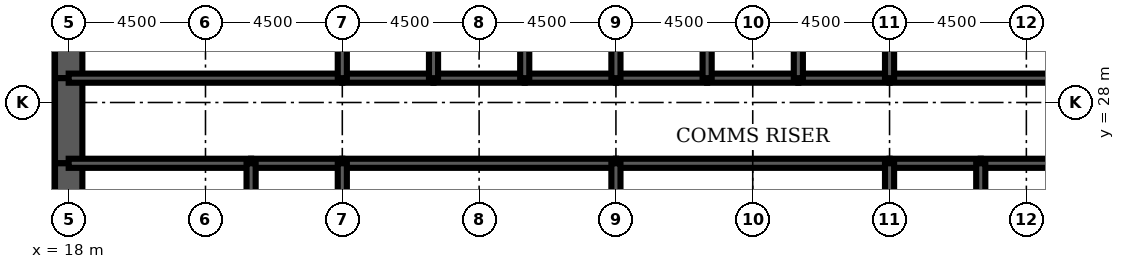
"""IFC4 building model, lengths in metres.
Left out: names, types, materials, properties, quantities, classifications, styles, units other than length and angle.
Written with IfcOpenShell. Run it as: python <this file> out.ifc"""

import sys

from ifc_helpers import new_model, si_unit, direction, frame, frame_2d, origin, place, context, subcontext, project, spatial, rectangle, extrude, element, fill, save


model = new_model("IFC4")
c1 = context("Model", 3, precision=1e-05, world=origin(), true_north=direction((0.0, 1.0)))
c2 = subcontext(c1, "Body", "Model", "MODEL_VIEW")
j1 = project(units=[si_unit("LENGTHUNIT", "METRE"), si_unit("PLANEANGLEUNIT", "RADIAN")], contexts=[c1])
p1 = place(None, origin())
s1 = spatial("IfcSite", under=j1, at=p1, CompositionType="ELEMENT")
p2 = place(p1, origin())
s2 = spatial("IfcBuilding", under=s1, at=p2, CompositionType="ELEMENT")
p3 = place(p2, frame((0.0, 0.0, 134.1)))
s3 = spatial("IfcBuildingStorey", under=s2, at=p3, CompositionType="ELEMENT", Elevation=134.1)
p4 = place(p3, frame((18.0, 32.0, 0.0), z_axis=(0.0, 0.0, 1.0), x_axis=(0.0, -1.0, 0.0)))
e1 = element("IfcWall", 1, at=p4, inside=s3, PredefinedType="SHEAR", context=c2, shape_type="SweptSolid", body=[
    extrude(rectangle(XDim=3.2, YDim=0.9, at=frame_2d((1.6, 0.0))), origin(), (0.0, 0.0, 1.0), 4.2),
])
p5 = place(p3, frame((18.0, 28.8, 0.0), z_axis=(0.0, 0.0, 1.0), x_axis=(0.0, -1.0, 0.0)))
e2 = element("IfcWall", 2, at=p5, inside=s3, PredefinedType="SHEAR", context=c2, shape_type="SweptSolid", body=[
    extrude(rectangle(XDim=2.8, YDim=0.9, at=frame_2d((1.4, 0.0))), origin(), (0.0, 0.0, 1.0), 4.2),
])
p6 = place(p5, frame((0.4, 0.0, 0.0)))
e3 = element("IfcOpeningElement", 3, at=p6, cuts=e2, PredefinedType="OPENING", context=c2, shape_type="SweptSolid", body=[
    extrude(rectangle(XDim=1.8, YDim=2.1, at=frame_2d((0.9, 1.05))), frame((0.0, 0.46, 0.0), z_axis=(0.0, -1.0, 0.0), x_axis=(1.0, 0.0, 0.0)), (0.0, 0.0, 1.0), 0.92),
])
p7 = place(p3, frame((18.0, 26.0, 0.0), z_axis=(0.0, 0.0, 1.0), x_axis=(0.0, -1.0, 0.0)))
e4 = element("IfcWall", 4, at=p7, inside=s3, PredefinedType="SHEAR", context=c2, shape_type="SweptSolid", body=[
    extrude(rectangle(XDim=4.0, YDim=0.9, at=frame_2d((2.0, 0.0))), origin(), (0.0, 0.0, 1.0), 4.2),
])
p8 = place(p3, frame((18.0, 28.8, 0.0), z_axis=(0.0, 0.0, 1.0), x_axis=(1.0, 0.0, 0.0)))
e5 = element("IfcWall", 5, at=p8, inside=s3, PredefinedType="SOLIDWALL", context=c2, shape_type="SweptSolid", body=[
    extrude(rectangle(XDim=9.0, YDim=0.3, at=frame_2d((4.5, 0.0))), origin(), (0.0, 0.0, 1.0), 4.2),
])
p9 = place(p8, frame((0.65, 0.0, 0.0)))
e6 = element("IfcOpeningElement", 6, at=p9, cuts=e5, PredefinedType="OPENING", context=c2, shape_type="SweptSolid", body=[
    extrude(rectangle(XDim=1.0, YDim=2.1, at=frame_2d((0.5, 1.05))), frame((0.0, 0.16, 0.0), z_axis=(0.0, -1.0, 0.0), x_axis=(1.0, 0.0, 0.0)), (0.0, 0.0, 1.0), 0.32),
])
p10 = place(p3, frame((27.0, 28.8, 0.0), z_axis=(0.0, 0.0, 1.0), x_axis=(1.0, 0.0, 0.0)))
e7 = element("IfcWall", 7, at=p10, inside=s3, PredefinedType="SOLIDWALL", context=c2, shape_type="SweptSolid", body=[
    extrude(rectangle(XDim=3.0, YDim=0.3, at=frame_2d((1.5, 0.0))), origin(), (0.0, 0.0, 1.0), 4.2),
])
p11 = place(p10, frame((0.95, 0.0, 0.0)))
e8 = element("IfcOpeningElement", 8, at=p11, cuts=e7, PredefinedType="OPENING", context=c2, shape_type="SweptSolid", body=[
    extrude(rectangle(XDim=1.1, YDim=2.2, at=frame_2d((0.55, 1.1))), frame((0.0, 0.16, 0.0), z_axis=(0.0, -1.0, 0.0), x_axis=(1.0, 0.0, 0.0)), (0.0, 0.0, 1.0), 0.32),
])
p12 = place(p3, frame((30.0, 28.8, 0.0), z_axis=(0.0, 0.0, 1.0), x_axis=(1.0, 0.0, 0.0)))
e9 = element("IfcWall", 9, at=p12, inside=s3, PredefinedType="SOLIDWALL", context=c2, shape_type="SweptSolid", body=[
    extrude(rectangle(XDim=3.0, YDim=0.3, at=frame_2d((1.5, 0.0))), origin(), (0.0, 0.0, 1.0), 4.2),
])
p13 = place(p12, frame((0.95, 0.0, 0.0)))
e10 = element("IfcOpeningElement", 10, at=p13, cuts=e9, PredefinedType="OPENING", context=c2, shape_type="SweptSolid", body=[
    extrude(rectangle(XDim=1.1, YDim=2.2, at=frame_2d((0.55, 1.1))), frame((0.0, 0.16, 0.0), z_axis=(0.0, -1.0, 0.0), x_axis=(1.0, 0.0, 0.0)), (0.0, 0.0, 1.0), 0.32),
])
p14 = place(p3, frame((33.0, 28.8, 0.0), z_axis=(0.0, 0.0, 1.0), x_axis=(1.0, 0.0, 0.0)))
e11 = element("IfcWall", 11, at=p14, inside=s3, PredefinedType="SOLIDWALL", context=c2, shape_type="SweptSolid", body=[
    extrude(rectangle(XDim=3.0, YDim=0.3, at=frame_2d((1.5, 0.0))), origin(), (0.0, 0.0, 1.0), 4.2),
])
p15 = place(p14, frame((0.95, 0.0, 0.0)))
e12 = element("IfcOpeningElement", 12, at=p15, cuts=e11, PredefinedType="OPENING", context=c2, shape_type="SweptSolid", body=[
    extrude(rectangle(XDim=1.1, YDim=2.2, at=frame_2d((0.55, 1.1))), frame((0.0, 0.16, 0.0), z_axis=(0.0, -1.0, 0.0), x_axis=(1.0, 0.0, 0.0)), (0.0, 0.0, 1.0), 0.32),
])
for number, where, z_axis, x_axis in (
    (13, (36.0, 28.8, 0.0), (0.0, 0.0, 1.0), (1.0, 0.0, 0.0)),
    (14, (39.0, 28.8, 0.0), (0.0, 0.0, 1.0), (1.0, 0.0, 0.0)),
):
    element("IfcWall", number, at=place(p3, frame(where, z_axis=z_axis, x_axis=x_axis)), inside=s3, PredefinedType="SOLIDWALL", context=c2, shape_type="SweptSolid", body=[
        extrude(rectangle(XDim=3.0, YDim=0.3, at=frame_2d((1.5, 0.0))), origin(), (0.0, 0.0, 1.0), 4.2),
    ])
p16 = place(p3, frame((42.0, 28.8, 0.0), z_axis=(0.0, 0.0, 1.0), x_axis=(1.0, 0.0, 0.0)))
e15 = element("IfcWall", 15, at=p16, inside=s3, PredefinedType="SOLIDWALL", context=c2, shape_type="SweptSolid", body=[
    extrude(rectangle(XDim=3.0, YDim=0.3, at=frame_2d((1.5, 0.0))), origin(), (0.0, 0.0, 1.0), 4.2),
])
p17 = place(p16, frame((0.95, 0.0, 0.0)))
e16 = element("IfcOpeningElement", 16, at=p17, cuts=e15, PredefinedType="OPENING", context=c2, shape_type="SweptSolid", body=[
    extrude(rectangle(XDim=1.1, YDim=2.2, at=frame_2d((0.55, 1.1))), frame((0.0, 0.16, 0.0), z_axis=(0.0, -1.0, 0.0), x_axis=(1.0, 0.0, 0.0)), (0.0, 0.0, 1.0), 0.32),
])
p18 = place(p3, frame((45.0, 28.8, 0.0), z_axis=(0.0, 0.0, 1.0), x_axis=(1.0, 0.0, 0.0)))
e17 = element("IfcWall", 17, at=p18, inside=s3, PredefinedType="SOLIDWALL", context=c2, shape_type="SweptSolid", body=[
    extrude(rectangle(XDim=9.0, YDim=0.3, at=frame_2d((4.5, 0.0))), origin(), (0.0, 0.0, 1.0), 4.2),
])
p19 = place(p18, frame((7.35, 0.0, 0.0)))
e18 = element("IfcOpeningElement", 18, at=p19, cuts=e17, PredefinedType="OPENING", context=c2, shape_type="SweptSolid", body=[
    extrude(rectangle(XDim=1.0, YDim=2.1, at=frame_2d((0.5, 1.05))), frame((0.0, 0.16, 0.0), z_axis=(0.0, -1.0, 0.0), x_axis=(1.0, 0.0, 0.0)), (0.0, 0.0, 1.0), 0.32),
])
p20 = place(p3, frame((18.0, 26.0, 0.0), z_axis=(0.0, 0.0, 1.0), x_axis=(1.0, 0.0, 0.0)))
e19 = element("IfcWall", 19, at=p20, inside=s3, PredefinedType="SOLIDWALL", context=c2, shape_type="SweptSolid", body=[
    extrude(rectangle(XDim=6.0, YDim=0.3, at=frame_2d((3.0, 0.0))), origin(), (0.0, 0.0, 1.0), 4.2),
])
p21 = place(p3, frame((24.0, 26.0, 0.0), z_axis=(0.0, 0.0, 1.0), x_axis=(1.0, 0.0, 0.0)))
e20 = element("IfcWall", 20, at=p21, inside=s3, PredefinedType="SOLIDWALL", context=c2, shape_type="SweptSolid", body=[
    extrude(rectangle(XDim=3.0, YDim=0.3, at=frame_2d((1.5, 0.0))), origin(), (0.0, 0.0, 1.0), 4.2),
])
for number, where, z_axis, x_axis in (
    (21, (27.0, 26.0, 0.0), (0.0, 0.0, 1.0), (1.0, 0.0, 0.0)),
    (22, (36.0, 26.0, 0.0), (0.0, 0.0, 1.0), (1.0, 0.0, 0.0)),
):
    element("IfcWall", number, at=place(p3, frame(where, z_axis=z_axis, x_axis=x_axis)), inside=s3, PredefinedType="SOLIDWALL", context=c2, shape_type="SweptSolid", body=[
        extrude(rectangle(XDim=9.0, YDim=0.3, at=frame_2d((4.5, 0.0))), origin(), (0.0, 0.0, 1.0), 4.2),
    ])
p22 = place(p3, frame((45.0, 26.0, 0.0), z_axis=(0.0, 0.0, 1.0), x_axis=(1.0, 0.0, 0.0)))
e23 = element("IfcWall", 23, at=p22, inside=s3, PredefinedType="SOLIDWALL", context=c2, shape_type="SweptSolid", body=[
    extrude(rectangle(XDim=3.0, YDim=0.3, at=frame_2d((1.5, 0.0))), origin(), (0.0, 0.0, 1.0), 4.2),
])
p23 = place(p3, frame((48.0, 26.0, 0.0), z_axis=(0.0, 0.0, 1.0), x_axis=(1.0, 0.0, 0.0)))
e24 = element("IfcWall", 24, at=p23, inside=s3, PredefinedType="SOLIDWALL", context=c2, shape_type="SweptSolid", body=[
    extrude(rectangle(XDim=6.0, YDim=0.3, at=frame_2d((3.0, 0.0))), origin(), (0.0, 0.0, 1.0), 4.2),
])
for number, where, z_axis, x_axis in (
    (25, (27.0, 28.8, 0.0), (0.0, 0.0, 1.0), (0.0, 1.0, 0.0)),
    (26, (30.0, 28.8, 0.0), (0.0, 0.0, 1.0), (0.0, 1.0, 0.0)),
    (27, (33.0, 28.8, 0.0), (0.0, 0.0, 1.0), (0.0, 1.0, 0.0)),
    (28, (36.0, 28.8, 0.0), (0.0, 0.0, 1.0), (0.0, 1.0, 0.0)),
    (29, (39.0, 28.8, 0.0), (0.0, 0.0, 1.0), (0.0, 1.0, 0.0)),
    (30, (42.0, 28.8, 0.0), (0.0, 0.0, 1.0), (0.0, 1.0, 0.0)),
    (31, (45.0, 28.8, 0.0), (0.0, 0.0, 1.0), (0.0, 1.0, 0.0)),
):
    element("IfcWall", number, at=place(p3, frame(where, z_axis=z_axis, x_axis=x_axis)), inside=s3, PredefinedType="SOLIDWALL", context=c2, shape_type="SweptSolid", body=[
        extrude(rectangle(XDim=3.2, YDim=0.3, at=frame_2d((1.6, 0.0))), origin(), (0.0, 0.0, 1.0), 4.2),
    ])
for number, where, z_axis, x_axis in (
    (32, (24.0, 22.0, 0.0), (0.0, 0.0, 1.0), (0.0, 1.0, 0.0)),
    (33, (27.0, 22.0, 0.0), (0.0, 0.0, 1.0), (0.0, 1.0, 0.0)),
    (34, (36.0, 22.0, 0.0), (0.0, 0.0, 1.0), (0.0, 1.0, 0.0)),
    (35, (45.0, 22.0, 0.0), (0.0, 0.0, 1.0), (0.0, 1.0, 0.0)),
    (36, (48.0, 22.0, 0.0), (0.0, 0.0, 1.0), (0.0, 1.0, 0.0)),
):
    element("IfcWall", number, at=place(p3, frame(where, z_axis=z_axis, x_axis=x_axis)), inside=s3, PredefinedType="SOLIDWALL", context=c2, shape_type="SweptSolid", body=[
        extrude(rectangle(XDim=4.0, YDim=0.3, at=frame_2d((2.0, 0.0))), origin(), (0.0, 0.0, 1.0), 4.2),
    ])
p24 = place(p3, frame((20.025, 22.15, 0.0), z_axis=(0.0, 0.0, 1.0), x_axis=(0.0, 1.0, 0.0)))
e37 = element("IfcWall", 37, at=p24, inside=s3, PredefinedType="PARTITIONING", context=c2, shape_type="SweptSolid", body=[
    extrude(rectangle(XDim=3.7, YDim=0.15, at=frame_2d((1.85, 0.0))), origin(), (0.0, 0.0, 1.0), 3.0),
])
p25 = place(p3, frame((49.2, 26.15, 0.0), z_axis=(0.0, 0.0, 1.0), x_axis=(0.0, 1.0, 0.0)))
e38 = element("IfcWall", 38, at=p25, inside=s3, PredefinedType="PARTITIONING", context=c2, shape_type="SweptSolid", body=[
    extrude(rectangle(XDim=2.5, YDim=0.15, at=frame_2d((1.25, 0.0))), origin(), (0.0, 0.0, 1.0), 3.0),
])
p26 = place(p25, frame((1.15, 0.0, 0.0)))
e39 = element("IfcOpeningElement", 39, at=p26, cuts=e38, PredefinedType="OPENING", context=c2, shape_type="SweptSolid", body=[
    extrude(rectangle(XDim=1.0, YDim=2.1, at=frame_2d((0.5, 1.05))), frame((0.0, 0.085, 0.0), z_axis=(0.0, -1.0, 0.0), x_axis=(1.0, 0.0, 0.0)), (0.0, 0.0, 1.0), 0.17),
])
p27 = place(p26, origin())
e40 = element("IfcDoor", 40, at=p27, inside=s3, OperationType="SINGLE_SWING_RIGHT", PredefinedType="DOOR", context=c2, shape_type="SweptSolid", body=[
    extrude(rectangle(XDim=1.0, YDim=2.1, at=frame_2d((0.5, 1.05))), frame((0.0, 0.025, 0.0), z_axis=(0.0, -1.0, 0.0), x_axis=(1.0, 0.0, 0.0)), (0.0, 0.0, 1.0), 0.05),
])
fill(e39, e40)
p28 = place(p17, origin())
e41 = element("IfcDoor", 41, at=p28, inside=s3, OperationType="DOUBLE_DOOR_SLIDING", PredefinedType="USERDEFINED", context=c2, shape_type="SweptSolid", body=[
    extrude(rectangle(XDim=1.1, YDim=2.2, at=frame_2d((0.55, 1.1))), frame((0.0, 0.025, 0.0), z_axis=(0.0, -1.0, 0.0), x_axis=(1.0, 0.0, 0.0)), (0.0, 0.0, 1.0), 0.05),
])
fill(e16, e41)
p29 = place(p11, origin())
e42 = element("IfcDoor", 42, at=p29, inside=s3, OperationType="DOUBLE_DOOR_SLIDING", PredefinedType="USERDEFINED", context=c2, shape_type="SweptSolid", body=[
    extrude(rectangle(XDim=1.1, YDim=2.2, at=frame_2d((0.55, 1.1))), frame((0.0, 0.025, 0.0), z_axis=(0.0, -1.0, 0.0), x_axis=(1.0, 0.0, 0.0)), (0.0, 0.0, 1.0), 0.05),
])
fill(e8, e42)
p30 = place(p13, origin())
e43 = element("IfcDoor", 43, at=p30, inside=s3, OperationType="DOUBLE_DOOR_SLIDING", PredefinedType="USERDEFINED", context=c2, shape_type="SweptSolid", body=[
    extrude(rectangle(XDim=1.1, YDim=2.2, at=frame_2d((0.55, 1.1))), frame((0.0, 0.025, 0.0), z_axis=(0.0, -1.0, 0.0), x_axis=(1.0, 0.0, 0.0)), (0.0, 0.0, 1.0), 0.05),
])
fill(e10, e43)
p31 = place(p15, origin())
e44 = element("IfcDoor", 44, at=p31, inside=s3, OperationType="DOUBLE_DOOR_SLIDING", PredefinedType="USERDEFINED", context=c2, shape_type="SweptSolid", body=[
    extrude(rectangle(XDim=1.1, YDim=2.2, at=frame_2d((0.55, 1.1))), frame((0.0, 0.025, 0.0), z_axis=(0.0, -1.0, 0.0), x_axis=(1.0, 0.0, 0.0)), (0.0, 0.0, 1.0), 0.05),
])
fill(e12, e44)
p32 = place(p9, origin())
e45 = element("IfcDoor", 45, at=p32, inside=s3, OperationType="SINGLE_SWING_LEFT", PredefinedType="DOOR", context=c2, shape_type="SweptSolid", body=[
    extrude(rectangle(XDim=1.0, YDim=2.1, at=frame_2d((0.5, 1.05))), frame((0.0, 0.025, 0.0), z_axis=(0.0, -1.0, 0.0), x_axis=(1.0, 0.0, 0.0)), (0.0, 0.0, 1.0), 0.05),
])
fill(e6, e45)
p33 = place(p6, origin())
e46 = element("IfcDoor", 46, at=p33, inside=s3, OperationType="SINGLE_SWING_LEFT", PredefinedType="DOOR", context=c2, shape_type="SweptSolid", body=[
    extrude(rectangle(XDim=1.8, YDim=2.1, at=frame_2d((0.9, 1.05))), frame((0.0, 0.45, 0.0), z_axis=(0.0, -1.0, 0.0), x_axis=(1.0, 0.0, 0.0)), (0.0, 0.0, 1.0), 0.899),
])
fill(e3, e46)
save(model, sys.argv[1])
